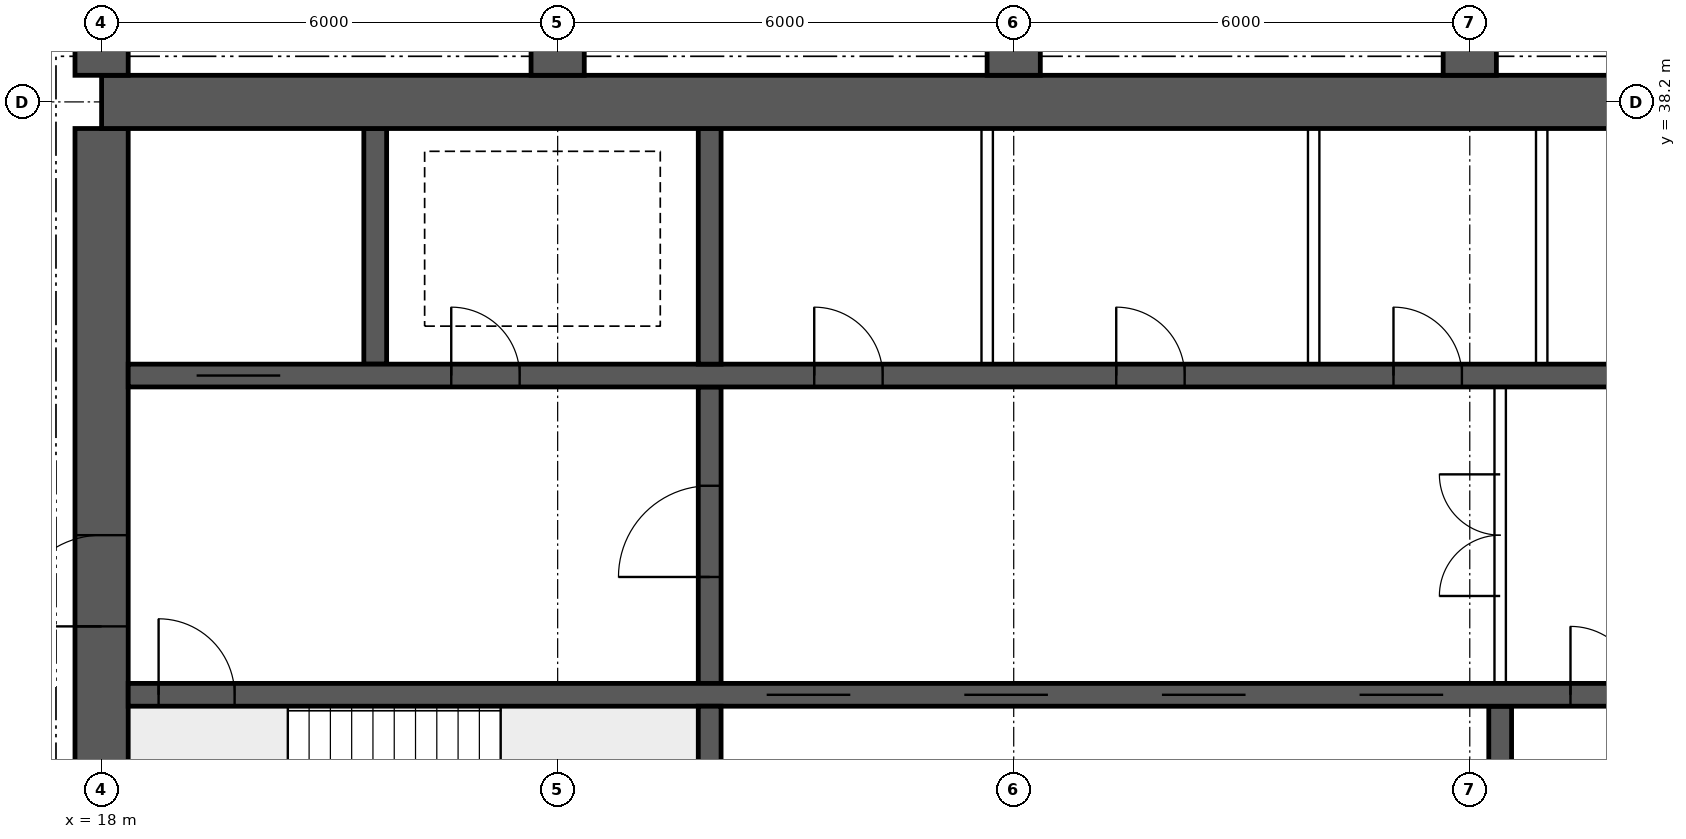
"""IFC4 building model, lengths in metres.
Left out: names, types, materials, properties, quantities, classifications, styles, units other than length and angle.
Written with IfcOpenShell. Run it as: python <this file> out.ifc"""

import sys

from ifc_helpers import new_model, si_unit, direction, frame, frame_2d, origin, place, context, subcontext, project, spatial, rectangle, extrude, element, fill, save


model = new_model("IFC4")
c1 = context("Model", 3, precision=1e-05, world=origin(), true_north=direction((0.0, 1.0)))
c2 = subcontext(c1, "Body", "Model", "MODEL_VIEW")
j1 = project(units=[si_unit("LENGTHUNIT", "METRE"), si_unit("PLANEANGLEUNIT", "RADIAN")], contexts=[c1])
p1 = place(None, origin())
s1 = spatial("IfcSite", under=j1, at=p1, CompositionType="ELEMENT")
p2 = place(p1, origin())
s2 = spatial("IfcBuilding", under=s1, at=p2, CompositionType="ELEMENT")
p3 = place(p2, frame((0.0, 0.0, 239.05)))
s3 = spatial("IfcBuildingStorey", under=s2, at=p3, CompositionType="ELEMENT", Elevation=239.05)
p4 = place(p3, frame((18.0, 38.2, 0.0), z_axis=(0.0, 0.0, 1.0), x_axis=(1.0, 0.0, 0.0)))
e1 = element("IfcWall", 1, at=p4, inside=s3, PredefinedType="SHEAR", context=c2, shape_type="SweptSolid", body=[
    extrude(rectangle(XDim=48.0, YDim=0.7, at=frame_2d((24.0, 0.0))), origin(), (0.0, 0.0, 1.0), 3.75),
])
p5 = place(p3, frame((18.0, 26.15, 0.0), z_axis=(0.0, 0.0, 1.0), x_axis=(0.0, 1.0, 0.0)))
e2 = element("IfcWall", 2, at=p5, inside=s3, PredefinedType="SHEAR", context=c2, shape_type="SweptSolid", body=[
    extrude(rectangle(XDim=11.7, YDim=0.7, at=frame_2d((5.85, 0.0))), origin(), (0.0, 0.0, 1.0), 3.75),
])
p6 = place(p5, frame((5.15, 0.0, 0.0)))
e3 = element("IfcOpeningElement", 3, at=p6, cuts=e2, PredefinedType="OPENING", context=c2, shape_type="SweptSolid", body=[
    extrude(rectangle(XDim=1.2, YDim=2.1, at=frame_2d((0.6, 1.05))), frame((0.0, 0.36, 0.0), z_axis=(0.0, -1.0, 0.0), x_axis=(1.0, 0.0, 0.0)), (0.0, 0.0, 1.0), 0.72),
])
p7 = place(p3, frame((18.35, 30.4, 0.0), z_axis=(0.0, 0.0, 1.0), x_axis=(1.0, 0.0, 0.0)))
e4 = element("IfcWall", 4, at=p7, inside=s3, PredefinedType="SHEAR", context=c2, shape_type="SweptSolid", body=[
    extrude(rectangle(XDim=47.3, YDim=0.3, at=frame_2d((23.65, 0.0))), origin(), (0.0, 0.0, 1.0), 3.75),
])
p8 = place(p7, frame((0.4, 0.0, 0.0)))
e5 = element("IfcOpeningElement", 5, at=p8, cuts=e4, PredefinedType="OPENING", context=c2, shape_type="SweptSolid", body=[
    extrude(rectangle(XDim=1.0, YDim=2.1, at=frame_2d((0.5, 1.05))), frame((0.0, 0.16, 0.0), z_axis=(0.0, -1.0, 0.0), x_axis=(1.0, 0.0, 0.0)), (0.0, 0.0, 1.0), 0.32),
])
p9 = place(p7, frame((45.9, 0.0, 0.0)))
e6 = element("IfcOpeningElement", 6, at=p9, cuts=e4, PredefinedType="OPENING", context=c2, shape_type="SweptSolid", body=[
    extrude(rectangle(XDim=1.0, YDim=2.1, at=frame_2d((0.5, 1.05))), frame((0.0, 0.16, 0.0), z_axis=(0.0, -1.0, 0.0), x_axis=(1.0, 0.0, 0.0)), (0.0, 0.0, 1.0), 0.32),
])
p10 = place(p7, frame((8.4, 0.0, 0.0)))
e7 = element("IfcOpeningElement", 7, at=p10, cuts=e4, PredefinedType="OPENING", context=c2, shape_type="SweptSolid", body=[
    extrude(rectangle(XDim=1.1, YDim=2.1, at=frame_2d((0.55, 1.05))), frame((0.0, 0.16, 0.0), z_axis=(0.0, -1.0, 0.0), x_axis=(1.0, 0.0, 0.0)), (0.0, 0.0, 1.0), 0.32),
])
p11 = place(p7, frame((11.0, 0.0, 0.0)))
e8 = element("IfcOpeningElement", 8, at=p11, cuts=e4, PredefinedType="OPENING", context=c2, shape_type="SweptSolid", body=[
    extrude(rectangle(XDim=1.1, YDim=2.1, at=frame_2d((0.55, 1.05))), frame((0.0, 0.16, 0.0), z_axis=(0.0, -1.0, 0.0), x_axis=(1.0, 0.0, 0.0)), (0.0, 0.0, 1.0), 0.32),
])
p12 = place(p7, frame((13.6, 0.0, 0.0)))
e9 = element("IfcOpeningElement", 9, at=p12, cuts=e4, PredefinedType="OPENING", context=c2, shape_type="SweptSolid", body=[
    extrude(rectangle(XDim=1.1, YDim=2.1, at=frame_2d((0.55, 1.05))), frame((0.0, 0.16, 0.0), z_axis=(0.0, -1.0, 0.0), x_axis=(1.0, 0.0, 0.0)), (0.0, 0.0, 1.0), 0.32),
])
p13 = place(p7, frame((16.2, 0.0, 0.0)))
e10 = element("IfcOpeningElement", 10, at=p13, cuts=e4, PredefinedType="OPENING", context=c2, shape_type="SweptSolid", body=[
    extrude(rectangle(XDim=1.1, YDim=2.1, at=frame_2d((0.55, 1.05))), frame((0.0, 0.16, 0.0), z_axis=(0.0, -1.0, 0.0), x_axis=(1.0, 0.0, 0.0)), (0.0, 0.0, 1.0), 0.32),
])
p14 = place(p7, frame((18.975, 0.0, 0.0)))
e11 = element("IfcOpeningElement", 11, at=p14, cuts=e4, PredefinedType="OPENING", context=c2, shape_type="SweptSolid", body=[
    extrude(rectangle(XDim=0.9, YDim=2.1, at=frame_2d((0.45, 1.05))), frame((0.0, 0.16, 0.0), z_axis=(0.0, -1.0, 0.0), x_axis=(1.0, 0.0, 0.0)), (0.0, 0.0, 1.0), 0.32),
])
p15 = place(p7, frame((24.475, 0.0, 0.0)))
e12 = element("IfcOpeningElement", 12, at=p15, cuts=e4, PredefinedType="OPENING", context=c2, shape_type="SweptSolid", body=[
    extrude(rectangle(XDim=0.9, YDim=2.1, at=frame_2d((0.45, 1.05))), frame((0.0, 0.16, 0.0), z_axis=(0.0, -1.0, 0.0), x_axis=(1.0, 0.0, 0.0)), (0.0, 0.0, 1.0), 0.32),
])
p16 = place(p7, frame((30.267, 0.0, 0.0)))
e13 = element("IfcOpeningElement", 13, at=p16, cuts=e4, PredefinedType="OPENING", context=c2, shape_type="SweptSolid", body=[
    extrude(rectangle(XDim=1.1, YDim=2.1, at=frame_2d((0.55, 1.05))), frame((0.0, 0.16, 0.0), z_axis=(0.0, -1.0, 0.0), x_axis=(1.0, 0.0, 0.0)), (0.0, 0.0, 1.0), 0.32),
])
p17 = place(p7, frame((33.8, 0.0, 0.0)))
e14 = element("IfcOpeningElement", 14, at=p17, cuts=e4, PredefinedType="OPENING", context=c2, shape_type="SweptSolid", body=[
    extrude(rectangle(XDim=1.1, YDim=2.1, at=frame_2d((0.55, 1.05))), frame((0.0, 0.16, 0.0), z_axis=(0.0, -1.0, 0.0), x_axis=(1.0, 0.0, 0.0)), (0.0, 0.0, 1.0), 0.32),
])
p18 = place(p7, frame((37.333, 0.0, 0.0)))
e15 = element("IfcOpeningElement", 15, at=p18, cuts=e4, PredefinedType="OPENING", context=c2, shape_type="SweptSolid", body=[
    extrude(rectangle(XDim=1.1, YDim=2.1, at=frame_2d((0.55, 1.05))), frame((0.0, 0.16, 0.0), z_axis=(0.0, -1.0, 0.0), x_axis=(1.0, 0.0, 0.0)), (0.0, 0.0, 1.0), 0.32),
])
p19 = place(p3, frame((18.35, 34.6, 0.0), z_axis=(0.0, 0.0, 1.0), x_axis=(1.0, 0.0, 0.0)))
e16 = element("IfcWall", 16, at=p19, inside=s3, PredefinedType="SHEAR", context=c2, shape_type="SweptSolid", body=[
    extrude(rectangle(XDim=47.3, YDim=0.3, at=frame_2d((23.65, 0.0))), origin(), (0.0, 0.0, 1.0), 3.75),
])
p20 = place(p19, frame((0.9, 0.0, 0.0)))
e17 = element("IfcOpeningElement", 17, at=p20, cuts=e16, PredefinedType="OPENING", context=c2, shape_type="SweptSolid", body=[
    extrude(rectangle(XDim=1.1, YDim=2.1, at=frame_2d((0.55, 1.05))), frame((0.0, 0.16, 0.0), z_axis=(0.0, -1.0, 0.0), x_axis=(1.0, 0.0, 0.0)), (0.0, 0.0, 1.0), 0.32),
])
p21 = place(p19, frame((45.3, 0.0, 0.0)))
e18 = element("IfcOpeningElement", 18, at=p21, cuts=e16, PredefinedType="OPENING", context=c2, shape_type="SweptSolid", body=[
    extrude(rectangle(XDim=1.1, YDim=2.1, at=frame_2d((0.55, 1.05))), frame((0.0, 0.16, 0.0), z_axis=(0.0, -1.0, 0.0), x_axis=(1.0, 0.0, 0.0)), (0.0, 0.0, 1.0), 0.32),
])
p22 = place(p19, frame((4.25, 0.0, 0.0)))
e19 = element("IfcOpeningElement", 19, at=p22, cuts=e16, PredefinedType="OPENING", context=c2, shape_type="SweptSolid", body=[
    extrude(rectangle(XDim=0.9, YDim=2.1, at=frame_2d((0.45, 1.05))), frame((0.0, 0.16, 0.0), z_axis=(0.0, -1.0, 0.0), x_axis=(1.0, 0.0, 0.0)), (0.0, 0.0, 1.0), 0.32),
])
p23 = place(p19, frame((42.15, 0.0, 0.0)))
e20 = element("IfcOpeningElement", 20, at=p23, cuts=e16, PredefinedType="OPENING", context=c2, shape_type="SweptSolid", body=[
    extrude(rectangle(XDim=0.9, YDim=2.1, at=frame_2d((0.45, 1.05))), frame((0.0, 0.16, 0.0), z_axis=(0.0, -1.0, 0.0), x_axis=(1.0, 0.0, 0.0)), (0.0, 0.0, 1.0), 0.32),
])
p24 = place(p19, frame((9.025, 0.0, 0.0)))
e21 = element("IfcOpeningElement", 21, at=p24, cuts=e16, PredefinedType="OPENING", context=c2, shape_type="SweptSolid", body=[
    extrude(rectangle(XDim=0.9, YDim=2.1, at=frame_2d((0.45, 1.05))), frame((0.0, 0.16, 0.0), z_axis=(0.0, -1.0, 0.0), x_axis=(1.0, 0.0, 0.0)), (0.0, 0.0, 1.0), 0.32),
])
p25 = place(p19, frame((12.999, 0.0, 0.0)))
e22 = element("IfcOpeningElement", 22, at=p25, cuts=e16, PredefinedType="OPENING", context=c2, shape_type="SweptSolid", body=[
    extrude(rectangle(XDim=0.9, YDim=2.1, at=frame_2d((0.45, 1.05))), frame((0.0, 0.16, 0.0), z_axis=(0.0, -1.0, 0.0), x_axis=(1.0, 0.0, 0.0)), (0.0, 0.0, 1.0), 0.32),
])
p26 = place(p19, frame((16.646, 0.0, 0.0)))
e23 = element("IfcOpeningElement", 23, at=p26, cuts=e16, PredefinedType="OPENING", context=c2, shape_type="SweptSolid", body=[
    extrude(rectangle(XDim=0.9, YDim=2.1, at=frame_2d((0.45, 1.05))), frame((0.0, 0.16, 0.0), z_axis=(0.0, -1.0, 0.0), x_axis=(1.0, 0.0, 0.0)), (0.0, 0.0, 1.0), 0.32),
])
p27 = place(p19, frame((20.405, 0.0, 0.0)))
e24 = element("IfcOpeningElement", 24, at=p27, cuts=e16, PredefinedType="OPENING", context=c2, shape_type="SweptSolid", body=[
    extrude(rectangle(XDim=0.9, YDim=2.1, at=frame_2d((0.45, 1.05))), frame((0.0, 0.16, 0.0), z_axis=(0.0, -1.0, 0.0), x_axis=(1.0, 0.0, 0.0)), (0.0, 0.0, 1.0), 0.32),
])
p28 = place(p19, frame((24.811, 0.0, 0.0)))
e25 = element("IfcOpeningElement", 25, at=p28, cuts=e16, PredefinedType="OPENING", context=c2, shape_type="SweptSolid", body=[
    extrude(rectangle(XDim=0.9, YDim=2.1, at=frame_2d((0.45, 1.05))), frame((0.0, 0.16, 0.0), z_axis=(0.0, -1.0, 0.0), x_axis=(1.0, 0.0, 0.0)), (0.0, 0.0, 1.0), 0.32),
])
p29 = place(p19, frame((27.608, 0.0, 0.0)))
e26 = element("IfcOpeningElement", 26, at=p29, cuts=e16, PredefinedType="OPENING", context=c2, shape_type="SweptSolid", body=[
    extrude(rectangle(XDim=0.9, YDim=2.1, at=frame_2d((0.45, 1.05))), frame((0.0, 0.16, 0.0), z_axis=(0.0, -1.0, 0.0), x_axis=(1.0, 0.0, 0.0)), (0.0, 0.0, 1.0), 0.32),
])
p30 = place(p19, frame((30.791, 0.0, 0.0)))
e27 = element("IfcOpeningElement", 27, at=p30, cuts=e16, PredefinedType="OPENING", context=c2, shape_type="SweptSolid", body=[
    extrude(rectangle(XDim=0.9, YDim=2.1, at=frame_2d((0.45, 1.05))), frame((0.0, 0.16, 0.0), z_axis=(0.0, -1.0, 0.0), x_axis=(1.0, 0.0, 0.0)), (0.0, 0.0, 1.0), 0.32),
])
p31 = place(p19, frame((34.742, 0.0, 0.0)))
e28 = element("IfcOpeningElement", 28, at=p31, cuts=e16, PredefinedType="OPENING", context=c2, shape_type="SweptSolid", body=[
    extrude(rectangle(XDim=0.9, YDim=2.1, at=frame_2d((0.45, 1.05))), frame((0.0, 0.16, 0.0), z_axis=(0.0, -1.0, 0.0), x_axis=(1.0, 0.0, 0.0)), (0.0, 0.0, 1.0), 0.32),
])
p32 = place(p19, frame((37.68, 0.0, 0.0)))
e29 = element("IfcOpeningElement", 29, at=p32, cuts=e16, PredefinedType="OPENING", context=c2, shape_type="SweptSolid", body=[
    extrude(rectangle(XDim=0.9, YDim=2.1, at=frame_2d((0.45, 1.05))), frame((0.0, 0.16, 0.0), z_axis=(0.0, -1.0, 0.0), x_axis=(1.0, 0.0, 0.0)), (0.0, 0.0, 1.0), 0.32),
])
p33 = place(p3, frame((26.0, 26.15, 0.0), z_axis=(0.0, 0.0, 1.0), x_axis=(0.0, 1.0, 0.0)))
e30 = element("IfcWall", 30, at=p33, inside=s3, PredefinedType="SHEAR", context=c2, shape_type="SweptSolid", body=[
    extrude(rectangle(XDim=4.1, YDim=0.3, at=frame_2d((2.05, 0.0))), origin(), (0.0, 0.0, 1.0), 3.75),
])
p34 = place(p3, frame((26.0, 30.55, 0.0), z_axis=(0.0, 0.0, 1.0), x_axis=(0.0, 1.0, 0.0)))
e31 = element("IfcWall", 31, at=p34, inside=s3, PredefinedType="SHEAR", context=c2, shape_type="SweptSolid", body=[
    extrude(rectangle(XDim=3.9, YDim=0.3, at=frame_2d((1.95, 0.0))), origin(), (0.0, 0.0, 1.0), 3.75),
])
p35 = place(p34, frame((1.4, 0.0, 0.0)))
e32 = element("IfcOpeningElement", 32, at=p35, cuts=e31, PredefinedType="OPENING", context=c2, shape_type="SweptSolid", body=[
    extrude(rectangle(XDim=1.2, YDim=2.1, at=frame_2d((0.6, 1.05))), frame((0.0, 0.16, 0.0), z_axis=(0.0, -1.0, 0.0), x_axis=(1.0, 0.0, 0.0)), (0.0, 0.0, 1.0), 0.32),
])
for number, where, z_axis, x_axis in (
    (33, (21.6, 34.75, 0.0), (0.0, 0.0, 1.0), (0.0, 1.0, 0.0)),
    (34, (26.0, 34.75, 0.0), (0.0, 0.0, 1.0), (0.0, 1.0, 0.0)),
):
    element("IfcWall", number, at=place(p3, frame(where, z_axis=z_axis, x_axis=x_axis)), inside=s3, PredefinedType="SHEAR", context=c2, shape_type="SweptSolid", body=[
        extrude(rectangle(XDim=3.1, YDim=0.3, at=frame_2d((1.55, 0.0))), origin(), (0.0, 0.0, 1.0), 3.75),
    ])
p36 = place(p3, frame((36.4, 26.15, 0.0), z_axis=(0.0, 0.0, 1.0), x_axis=(0.0, 1.0, 0.0)))
e35 = element("IfcWall", 35, at=p36, inside=s3, PredefinedType="SHEAR", context=c2, shape_type="SweptSolid", body=[
    extrude(rectangle(XDim=4.1, YDim=0.3, at=frame_2d((2.05, 0.0))), origin(), (0.0, 0.0, 1.0), 3.75),
])
for number, where, z_axis, x_axis in (
    (36, (18.0, 38.55, 0.0), (0.0, 0.0, 1.0), (0.0, 1.0, 0.0)),
    (37, (24.0, 38.55, 0.0), (0.0, 0.0, 1.0), (0.0, 1.0, 0.0)),
    (38, (30.0, 38.55, 0.0), (0.0, 0.0, 1.0), (0.0, 1.0, 0.0)),
    (39, (36.0, 38.55, 0.0), (0.0, 0.0, 1.0), (0.0, 1.0, 0.0)),
):
    element("IfcWall", number, at=place(p3, frame(where, z_axis=z_axis, x_axis=x_axis)), inside=s3, PredefinedType="SHEAR", context=c2, shape_type="SweptSolid", body=[
        extrude(rectangle(XDim=7.05, YDim=0.7, at=frame_2d((3.525, 0.0))), origin(), (0.0, 0.0, 1.0), 3.75),
    ])
p37 = place(p3, frame((36.4, 30.55, 0.0), z_axis=(0.0, 0.0, 1.0), x_axis=(0.0, 1.0, 0.0)))
e40 = element("IfcWall", 40, at=p37, inside=s3, PredefinedType="SOLIDWALL", context=c2, shape_type="SweptSolid", body=[
    extrude(rectangle(XDim=3.9, YDim=0.15, at=frame_2d((1.95, 0.0))), origin(), (0.0, 0.0, 1.0), 3.5),
])
p38 = place(p37, frame((1.15, 0.0, 0.0)))
e41 = element("IfcOpeningElement", 41, at=p38, cuts=e40, PredefinedType="OPENING", context=c2, shape_type="SweptSolid", body=[
    extrude(rectangle(XDim=1.6, YDim=2.1, at=frame_2d((0.8, 1.05))), frame((0.0, 0.085, 0.0), z_axis=(0.0, -1.0, 0.0), x_axis=(1.0, 0.0, 0.0)), (0.0, 0.0, 1.0), 0.17),
])
for number, where, z_axis, x_axis in (
    (42, (29.651, 34.75, 0.0), (0.0, 0.0, 1.0), (0.0, 1.0, 0.0)),
    (43, (33.946, 34.75, 0.0), (0.0, 0.0, 1.0), (0.0, 1.0, 0.0)),
    (44, (36.946, 34.75, 0.0), (0.0, 0.0, 1.0), (0.0, 1.0, 0.0)),
):
    element("IfcWall", number, at=place(p3, frame(where, z_axis=z_axis, x_axis=x_axis)), inside=s3, PredefinedType="SOLIDWALL", context=c2, shape_type="SweptSolid", body=[
        extrude(rectangle(XDim=3.1, YDim=0.15, at=frame_2d((1.55, 0.0))), origin(), (0.0, 0.0, 1.0), 3.5),
    ])
p39 = place(p38, origin())
e45 = element("IfcDoor", 45, at=p39, inside=s3, OperationType="DOUBLE_DOOR_SINGLE_SWING", PredefinedType="DOOR", context=c2, shape_type="SweptSolid", body=[
    extrude(rectangle(XDim=1.6, YDim=2.1, at=frame_2d((0.8, 1.05))), frame((0.0, 0.025, 0.0), z_axis=(0.0, -1.0, 0.0), x_axis=(1.0, 0.0, 0.0)), (0.0, 0.0, 1.0), 0.05),
])
fill(e41, e45)
p40 = place(p6, origin())
e46 = element("IfcDoor", 46, at=p40, inside=s3, OperationType="SINGLE_SWING_LEFT", PredefinedType="DOOR", context=c2, shape_type="SweptSolid", body=[
    extrude(rectangle(XDim=1.2, YDim=2.1, at=frame_2d((0.6, 1.05))), frame((0.0, 0.025, 0.0), z_axis=(0.0, -1.0, 0.0), x_axis=(1.0, 0.0, 0.0)), (0.0, 0.0, 1.0), 0.05),
])
fill(e3, e46)
p41 = place(p8, origin())
e47 = element("IfcDoor", 47, at=p41, inside=s3, OperationType="SINGLE_SWING_LEFT", PredefinedType="DOOR", context=c2, shape_type="SweptSolid", body=[
    extrude(rectangle(XDim=1.0, YDim=2.1, at=frame_2d((0.5, 1.05))), frame((0.0, 0.025, 0.0), z_axis=(0.0, -1.0, 0.0), x_axis=(1.0, 0.0, 0.0)), (0.0, 0.0, 1.0), 0.05),
])
fill(e5, e47)
p42 = place(p20, origin())
e48 = element("IfcDoor", 48, at=p42, inside=s3, OperationType="DOUBLE_DOOR_SLIDING", PredefinedType="DOOR", context=c2, shape_type="SweptSolid", body=[
    extrude(rectangle(XDim=1.1, YDim=2.1, at=frame_2d((0.55, 1.05))), frame((0.0, 0.025, 0.0), z_axis=(0.0, -1.0, 0.0), x_axis=(1.0, 0.0, 0.0)), (0.0, 0.0, 1.0), 0.05),
])
fill(e17, e48)
p43 = place(p22, origin())
e49 = element("IfcDoor", 49, at=p43, inside=s3, OperationType="SINGLE_SWING_LEFT", PredefinedType="DOOR", context=c2, shape_type="SweptSolid", body=[
    extrude(rectangle(XDim=0.9, YDim=2.1, at=frame_2d((0.45, 1.05))), frame((0.0, 0.025, 0.0), z_axis=(0.0, -1.0, 0.0), x_axis=(1.0, 0.0, 0.0)), (0.0, 0.0, 1.0), 0.05),
])
fill(e19, e49)
p44 = place(p35, origin())
e50 = element("IfcDoor", 50, at=p44, inside=s3, OperationType="SINGLE_SWING_LEFT", PredefinedType="DOOR", context=c2, shape_type="SweptSolid", body=[
    extrude(rectangle(XDim=1.2, YDim=2.1, at=frame_2d((0.6, 1.05))), frame((0.0, 0.025, 0.0), z_axis=(0.0, -1.0, 0.0), x_axis=(1.0, 0.0, 0.0)), (0.0, 0.0, 1.0), 0.05),
])
fill(e32, e50)
p45 = place(p24, origin())
e51 = element("IfcDoor", 51, at=p45, inside=s3, OperationType="SINGLE_SWING_LEFT", PredefinedType="DOOR", context=c2, shape_type="SweptSolid", body=[
    extrude(rectangle(XDim=0.9, YDim=2.1, at=frame_2d((0.45, 1.05))), frame((0.0, 0.025, 0.0), z_axis=(0.0, -1.0, 0.0), x_axis=(1.0, 0.0, 0.0)), (0.0, 0.0, 1.0), 0.05),
])
fill(e21, e51)
p46 = place(p25, origin())
e52 = element("IfcDoor", 52, at=p46, inside=s3, OperationType="SINGLE_SWING_LEFT", PredefinedType="DOOR", context=c2, shape_type="SweptSolid", body=[
    extrude(rectangle(XDim=0.9, YDim=2.1, at=frame_2d((0.45, 1.05))), frame((0.0, 0.025, 0.0), z_axis=(0.0, -1.0, 0.0), x_axis=(1.0, 0.0, 0.0)), (0.0, 0.0, 1.0), 0.05),
])
fill(e22, e52)
p47 = place(p26, origin())
e53 = element("IfcDoor", 53, at=p47, inside=s3, OperationType="SINGLE_SWING_LEFT", PredefinedType="DOOR", context=c2, shape_type="SweptSolid", body=[
    extrude(rectangle(XDim=0.9, YDim=2.1, at=frame_2d((0.45, 1.05))), frame((0.0, 0.025, 0.0), z_axis=(0.0, -1.0, 0.0), x_axis=(1.0, 0.0, 0.0)), (0.0, 0.0, 1.0), 0.05),
])
fill(e23, e53)
p48 = place(p10, origin())
e54 = element("IfcDoor", 54, at=p48, inside=s3, OperationType="DOUBLE_DOOR_SLIDING", PredefinedType="DOOR", context=c2, shape_type="SweptSolid", body=[
    extrude(rectangle(XDim=1.1, YDim=2.1, at=frame_2d((0.55, 1.05))), frame((0.0, 0.025, 0.0), z_axis=(0.0, -1.0, 0.0), x_axis=(1.0, 0.0, 0.0)), (0.0, 0.0, 1.0), 0.05),
])
fill(e7, e54)
p49 = place(p11, origin())
e55 = element("IfcDoor", 55, at=p49, inside=s3, OperationType="DOUBLE_DOOR_SLIDING", PredefinedType="DOOR", context=c2, shape_type="SweptSolid", body=[
    extrude(rectangle(XDim=1.1, YDim=2.1, at=frame_2d((0.55, 1.05))), frame((0.0, 0.025, 0.0), z_axis=(0.0, -1.0, 0.0), x_axis=(1.0, 0.0, 0.0)), (0.0, 0.0, 1.0), 0.05),
])
fill(e8, e55)
p50 = place(p12, origin())
e56 = element("IfcDoor", 56, at=p50, inside=s3, OperationType="DOUBLE_DOOR_SLIDING", PredefinedType="DOOR", context=c2, shape_type="SweptSolid", body=[
    extrude(rectangle(XDim=1.1, YDim=2.1, at=frame_2d((0.55, 1.05))), frame((0.0, 0.025, 0.0), z_axis=(0.0, -1.0, 0.0), x_axis=(1.0, 0.0, 0.0)), (0.0, 0.0, 1.0), 0.05),
])
fill(e9, e56)
p51 = place(p13, origin())
e57 = element("IfcDoor", 57, at=p51, inside=s3, OperationType="DOUBLE_DOOR_SLIDING", PredefinedType="DOOR", context=c2, shape_type="SweptSolid", body=[
    extrude(rectangle(XDim=1.1, YDim=2.1, at=frame_2d((0.55, 1.05))), frame((0.0, 0.025, 0.0), z_axis=(0.0, -1.0, 0.0), x_axis=(1.0, 0.0, 0.0)), (0.0, 0.0, 1.0), 0.05),
])
fill(e10, e57)
p52 = place(p14, origin())
e58 = element("IfcDoor", 58, at=p52, inside=s3, OperationType="SINGLE_SWING_LEFT", PredefinedType="DOOR", context=c2, shape_type="SweptSolid", body=[
    extrude(rectangle(XDim=0.9, YDim=2.1, at=frame_2d((0.45, 1.05))), frame((0.0, 0.025, 0.0), z_axis=(0.0, -1.0, 0.0), x_axis=(1.0, 0.0, 0.0)), (0.0, 0.0, 1.0), 0.05),
])
fill(e11, e58)
save(model, sys.argv[1])
